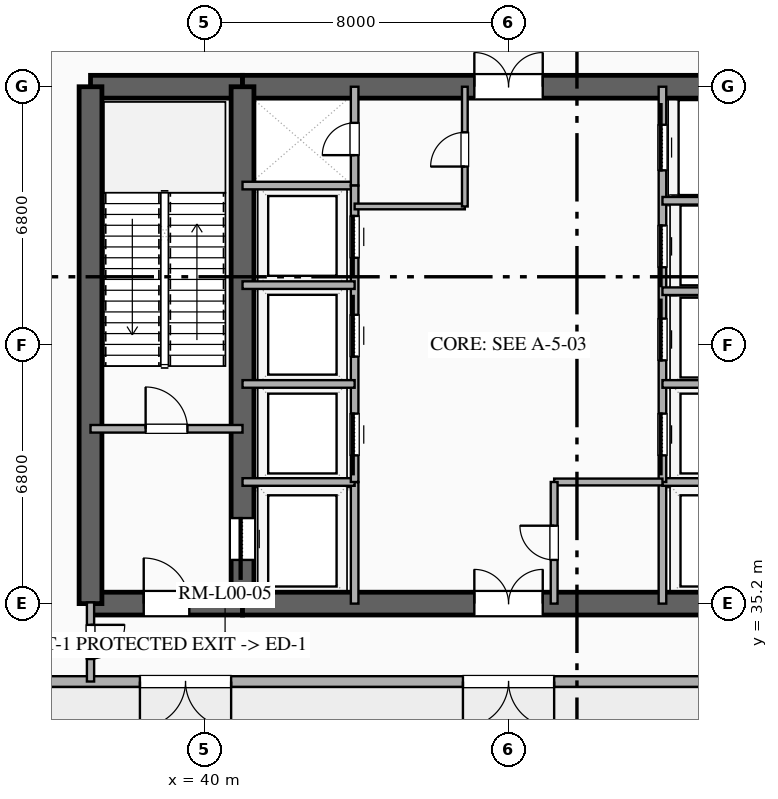
"""IFC4 building model, lengths in metres.
Left out: names, types, materials, properties, quantities, classifications, styles, units other than length and angle.
Written with IfcOpenShell. Run it as: python <this file> out.ifc"""

import sys

from ifc_helpers import new_model, si_unit, direction, frame, frame_2d, origin, place, context, subcontext, project, spatial, rectangle, extrude, element, fill, save


model = new_model("IFC4")
c1 = context("Model", 3, precision=1e-05, world=origin(), true_north=direction((0.0, 1.0)))
c2 = subcontext(c1, "Body", "Model", "MODEL_VIEW")
j1 = project(units=[si_unit("LENGTHUNIT", "METRE"), si_unit("PLANEANGLEUNIT", "RADIAN")], contexts=[c1])
p1 = place(None, origin())
s1 = spatial("IfcSite", under=j1, at=p1, CompositionType="ELEMENT")
p2 = place(p1, origin())
s2 = spatial("IfcBuilding", under=s1, at=p2, CompositionType="ELEMENT")
p3 = place(p2, origin())
s3 = spatial("IfcBuildingStorey", under=s2, at=p3, CompositionType="ELEMENT", Elevation=0.0)
p4 = place(p3, frame((37.0, 35.2, 0.0), z_axis=(0.0, 0.0, 1.0), x_axis=(1.0, 0.0, 0.0)))
e1 = element("IfcWall", 1, at=p4, inside=s3, PredefinedType="SHEAR", context=c2, shape_type="SweptSolid", body=[
    extrude(rectangle(XDim=4.0, YDim=0.6, at=frame_2d((2.0, 0.0))), origin(), (0.0, 0.0, 1.0), 5.72),
])
p5 = place(p4, frame((1.4, 0.0, 0.0)))
e2 = element("IfcOpeningElement", 2, at=p5, cuts=e1, PredefinedType="OPENING", context=c2, shape_type="SweptSolid", body=[
    extrude(rectangle(XDim=1.2, YDim=2.15, at=frame_2d((0.6, 1.075))), frame((0.0, 0.31, 0.0), z_axis=(0.0, -1.0, 0.0), x_axis=(1.0, 0.0, 0.0)), (0.0, 0.0, 1.0), 0.62),
])
p6 = place(p3, frame((41.0, 35.2, 0.0), z_axis=(0.0, 0.0, 1.0), x_axis=(1.0, 0.0, 0.0)))
e3 = element("IfcWall", 3, at=p6, inside=s3, PredefinedType="SHEAR", context=c2, shape_type="SweptSolid", body=[
    extrude(rectangle(XDim=14.0, YDim=0.6, at=frame_2d((7.0, 0.0))), origin(), (0.0, 0.0, 1.0), 5.72),
])
p7 = place(p6, frame((6.1, 0.0, 0.0)))
e4 = element("IfcOpeningElement", 4, at=p7, cuts=e3, PredefinedType="OPENING", context=c2, shape_type="SweptSolid", body=[
    extrude(rectangle(XDim=1.8, YDim=2.25, at=frame_2d((0.9, 1.125))), frame((0.0, 0.31, 0.0), z_axis=(0.0, -1.0, 0.0), x_axis=(1.0, 0.0, 0.0)), (0.0, 0.0, 1.0), 0.62),
])
p8 = place(p3, frame((37.0, 48.8, 0.0), z_axis=(0.0, 0.0, 1.0), x_axis=(1.0, 0.0, 0.0)))
e5 = element("IfcWall", 5, at=p8, inside=s3, PredefinedType="SHEAR", context=c2, shape_type="SweptSolid", body=[
    extrude(rectangle(XDim=4.0, YDim=0.6, at=frame_2d((2.0, 0.0))), origin(), (0.0, 0.0, 1.0), 5.72),
])
p9 = place(p3, frame((41.0, 48.8, 0.0), z_axis=(0.0, 0.0, 1.0), x_axis=(1.0, 0.0, 0.0)))
e6 = element("IfcWall", 6, at=p9, inside=s3, PredefinedType="SHEAR", context=c2, shape_type="SweptSolid", body=[
    extrude(rectangle(XDim=14.0, YDim=0.6, at=frame_2d((7.0, 0.0))), origin(), (0.0, 0.0, 1.0), 5.72),
])
p10 = place(p9, frame((6.1, 0.0, 0.0)))
e7 = element("IfcOpeningElement", 7, at=p10, cuts=e6, PredefinedType="OPENING", context=c2, shape_type="SweptSolid", body=[
    extrude(rectangle(XDim=1.8, YDim=2.25, at=frame_2d((0.9, 1.125))), frame((0.0, 0.31, 0.0), z_axis=(0.0, -1.0, 0.0), x_axis=(1.0, 0.0, 0.0)), (0.0, 0.0, 1.0), 0.62),
])
p11 = place(p3, frame((37.0, 35.2, 0.0), z_axis=(0.0, 0.0, 1.0), x_axis=(0.0, 1.0, 0.0)))
e8 = element("IfcWall", 8, at=p11, inside=s3, PredefinedType="SHEAR", context=c2, shape_type="SweptSolid", body=[
    extrude(rectangle(XDim=13.6, YDim=0.6, at=frame_2d((6.8, 0.0))), origin(), (0.0, 0.0, 1.0), 5.72),
])
p12 = place(p3, frame((41.0, 35.2, 0.0), z_axis=(0.0, 0.0, 1.0), x_axis=(0.0, 1.0, 0.0)))
e9 = element("IfcWall", 9, at=p12, inside=s3, PredefinedType="SHEAR", context=c2, shape_type="SweptSolid", body=[
    extrude(rectangle(XDim=13.6, YDim=0.6, at=frame_2d((6.8, 0.0))), origin(), (0.0, 0.0, 1.0), 5.72),
])
p13 = place(p12, frame((1.15, 0.0, 0.0)))
e10 = element("IfcOpeningElement", 10, at=p13, cuts=e9, PredefinedType="OPENING", context=c2, shape_type="SweptSolid", body=[
    extrude(rectangle(XDim=1.1, YDim=2.2, at=frame_2d((0.55, 1.1))), frame((0.0, 0.31, 0.0), z_axis=(0.0, -1.0, 0.0), x_axis=(1.0, 0.0, 0.0)), (0.0, 0.0, 1.0), 0.62),
])
p14 = place(p3, frame((88.0, 33.15, 0.0), z_axis=(0.0, 0.0, 1.0), x_axis=(-1.0, 0.0, 0.0)))
e11 = element("IfcWall", 11, at=p14, inside=s3, PredefinedType="SOLIDWALL", context=c2, shape_type="SweptSolid", body=[
    extrude(rectangle(XDim=80.0, YDim=0.28, at=frame_2d((40.0, 0.0))), origin(), (0.0, 0.0, 1.0), 5.72),
])
p15 = place(p14, frame((47.3, 0.0, 0.0)))
e12 = element("IfcOpeningElement", 12, at=p15, cuts=e11, PredefinedType="OPENING", context=c2, shape_type="SweptSolid", body=[
    extrude(rectangle(XDim=2.4, YDim=2.6, at=frame_2d((1.2, 1.3))), frame((0.0, 0.15, 0.0), z_axis=(0.0, -1.0, 0.0), x_axis=(1.0, 0.0, 0.0)), (0.0, 0.0, 1.0), 0.3),
])
p16 = place(p14, frame((38.8, 0.0, 0.0)))
e13 = element("IfcOpeningElement", 13, at=p16, cuts=e11, PredefinedType="OPENING", context=c2, shape_type="SweptSolid", body=[
    extrude(rectangle(XDim=2.4, YDim=2.6, at=frame_2d((1.2, 1.3))), frame((0.0, 0.15, 0.0), z_axis=(0.0, -1.0, 0.0), x_axis=(1.0, 0.0, 0.0)), (0.0, 0.0, 1.0), 0.3),
])
p17 = place(p14, frame((30.3, 0.0, 0.0)))
e14 = element("IfcOpeningElement", 14, at=p17, cuts=e11, PredefinedType="OPENING", context=c2, shape_type="SweptSolid", body=[
    extrude(rectangle(XDim=2.4, YDim=2.6, at=frame_2d((1.2, 1.3))), frame((0.0, 0.15, 0.0), z_axis=(0.0, -1.0, 0.0), x_axis=(1.0, 0.0, 0.0)), (0.0, 0.0, 1.0), 0.3),
])
p18 = place(p3, frame((37.0, 39.8, 0.0), z_axis=(0.0, 0.0, 1.0), x_axis=(1.0, 0.0, 0.0)))
e15 = element("IfcWall", 15, at=p18, inside=s3, PredefinedType="SOLIDWALL", context=c2, shape_type="SweptSolid", body=[
    extrude(rectangle(XDim=4.0, YDim=0.2, at=frame_2d((2.0, 0.0))), origin(), (0.0, 0.0, 1.0), 4.92),
])
p19 = place(p18, frame((1.45, 0.0, 0.0)))
e16 = element("IfcOpeningElement", 16, at=p19, cuts=e15, PredefinedType="OPENING", context=c2, shape_type="SweptSolid", body=[
    extrude(rectangle(XDim=1.1, YDim=2.15, at=frame_2d((0.55, 1.075))), frame((0.0, 0.11, 0.0), z_axis=(0.0, -1.0, 0.0), x_axis=(1.0, 0.0, 0.0)), (0.0, 0.0, 1.0), 0.22),
])
p20 = place(p3, frame((43.95, 35.2, 0.0), z_axis=(0.0, 0.0, 1.0), x_axis=(0.0, 1.0, 0.0)))
e17 = element("IfcWall", 17, at=p20, inside=s3, PredefinedType="SOLIDWALL", context=c2, shape_type="SweptSolid", body=[
    extrude(rectangle(XDim=3.2, YDim=0.2, at=frame_2d((1.6, 0.0))), origin(), (0.0, 0.0, 1.0), 4.92),
])
p21 = place(p3, frame((41.0, 38.4, 0.0), z_axis=(0.0, 0.0, 1.0), x_axis=(1.0, 0.0, 0.0)))
e18 = element("IfcWall", 18, at=p21, inside=s3, PredefinedType="SOLIDWALL", context=c2, shape_type="SweptSolid", body=[
    extrude(rectangle(XDim=2.95, YDim=0.2, at=frame_2d((1.475, 0.0))), origin(), (0.0, 0.0, 1.0), 4.92),
])
p22 = place(p3, frame((52.05, 35.2, 0.0), z_axis=(0.0, 0.0, 1.0), x_axis=(0.0, 1.0, 0.0)))
e19 = element("IfcWall", 19, at=p22, inside=s3, PredefinedType="SOLIDWALL", context=c2, shape_type="SweptSolid", body=[
    extrude(rectangle(XDim=3.2, YDim=0.2, at=frame_2d((1.6, 0.0))), origin(), (0.0, 0.0, 1.0), 4.92),
])
for number, where, z_axis, x_axis in (
    (20, (52.05, 38.4, 0.0), (0.0, 0.0, 1.0), (1.0, 0.0, 0.0)),
    (21, (41.0, 46.2, 0.0), (0.0, 0.0, 1.0), (1.0, 0.0, 0.0)),
):
    element("IfcWall", number, at=place(p3, frame(where, z_axis=z_axis, x_axis=x_axis)), inside=s3, PredefinedType="SOLIDWALL", context=c2, shape_type="SweptSolid", body=[
        extrude(rectangle(XDim=2.95, YDim=0.2, at=frame_2d((1.475, 0.0))), origin(), (0.0, 0.0, 1.0), 4.92),
    ])
p23 = place(p3, frame((43.95, 46.2, 0.0), z_axis=(0.0, 0.0, 1.0), x_axis=(0.0, 1.0, 0.0)))
e22 = element("IfcWall", 22, at=p23, inside=s3, PredefinedType="SOLIDWALL", context=c2, shape_type="SweptSolid", body=[
    extrude(rectangle(XDim=2.6, YDim=0.2, at=frame_2d((1.3, 0.0))), origin(), (0.0, 0.0, 1.0), 4.92),
])
p24 = place(p23, frame((0.8, 0.0, 0.0)))
e23 = element("IfcOpeningElement", 23, at=p24, cuts=e22, PredefinedType="OPENING", context=c2, shape_type="SweptSolid", body=[
    extrude(rectangle(XDim=0.85, YDim=2.15, at=frame_2d((0.425, 1.075))), frame((0.0, 0.11, 0.0), z_axis=(0.0, -1.0, 0.0), x_axis=(1.0, 0.0, 0.0)), (0.0, 0.0, 1.0), 0.22),
])
p25 = place(p3, frame((43.95, 38.4, 0.0), z_axis=(0.0, 0.0, 1.0), x_axis=(0.0, 1.0, 0.0)))
e24 = element("IfcWall", 24, at=p25, inside=s3, PredefinedType="SOLIDWALL", context=c2, shape_type="SweptSolid", body=[
    extrude(rectangle(XDim=7.8, YDim=0.2, at=frame_2d((3.9, 0.0))), origin(), (0.0, 0.0, 1.0), 4.92),
])
p26 = place(p25, frame((0.7, 0.0, 0.0)))
e25 = element("IfcOpeningElement", 25, at=p26, cuts=e24, PredefinedType="OPENING", context=c2, shape_type="SweptSolid", body=[
    extrude(rectangle(XDim=1.1, YDim=2.2, at=frame_2d((0.55, 1.1))), frame((0.0, 0.11, 0.0), z_axis=(0.0, -1.0, 0.0), x_axis=(1.0, 0.0, 0.0)), (0.0, 0.0, 1.0), 0.22),
])
p27 = place(p25, frame((3.3, 0.0, 0.0)))
e26 = element("IfcOpeningElement", 26, at=p27, cuts=e24, PredefinedType="OPENING", context=c2, shape_type="SweptSolid", body=[
    extrude(rectangle(XDim=1.1, YDim=2.2, at=frame_2d((0.55, 1.1))), frame((0.0, 0.11, 0.0), z_axis=(0.0, -1.0, 0.0), x_axis=(1.0, 0.0, 0.0)), (0.0, 0.0, 1.0), 0.22),
])
p28 = place(p25, frame((5.9, 0.0, 0.0)))
e27 = element("IfcOpeningElement", 27, at=p28, cuts=e24, PredefinedType="OPENING", context=c2, shape_type="SweptSolid", body=[
    extrude(rectangle(XDim=1.1, YDim=2.2, at=frame_2d((0.55, 1.1))), frame((0.0, 0.11, 0.0), z_axis=(0.0, -1.0, 0.0), x_axis=(1.0, 0.0, 0.0)), (0.0, 0.0, 1.0), 0.22),
])
for number, where, z_axis, x_axis in (
    (28, (41.0, 40.98, 0.0), (0.0, 0.0, 1.0), (1.0, 0.0, 0.0)),
    (29, (41.0, 43.58, 0.0), (0.0, 0.0, 1.0), (1.0, 0.0, 0.0)),
):
    element("IfcWall", number, at=place(p3, frame(where, z_axis=z_axis, x_axis=x_axis)), inside=s3, PredefinedType="SOLIDWALL", context=c2, shape_type="SweptSolid", body=[
        extrude(rectangle(XDim=2.95, YDim=0.2, at=frame_2d((1.475, 0.0))), origin(), (0.0, 0.0, 1.0), 4.92),
    ])
p29 = place(p3, frame((52.05, 38.4, 0.0), z_axis=(0.0, 0.0, 1.0), x_axis=(0.0, 1.0, 0.0)))
e30 = element("IfcWall", 30, at=p29, inside=s3, PredefinedType="SOLIDWALL", context=c2, shape_type="SweptSolid", body=[
    extrude(rectangle(XDim=10.4, YDim=0.2, at=frame_2d((5.2, 0.0))), origin(), (0.0, 0.0, 1.0), 4.92),
])
p30 = place(p29, frame((0.7, 0.0, 0.0)))
e31 = element("IfcOpeningElement", 31, at=p30, cuts=e30, PredefinedType="OPENING", context=c2, shape_type="SweptSolid", body=[
    extrude(rectangle(XDim=1.1, YDim=2.2, at=frame_2d((0.55, 1.1))), frame((0.0, 0.11, 0.0), z_axis=(0.0, -1.0, 0.0), x_axis=(1.0, 0.0, 0.0)), (0.0, 0.0, 1.0), 0.22),
])
p31 = place(p29, frame((3.2, 0.0, 0.0)))
e32 = element("IfcOpeningElement", 32, at=p31, cuts=e30, PredefinedType="OPENING", context=c2, shape_type="SweptSolid", body=[
    extrude(rectangle(XDim=1.1, YDim=2.2, at=frame_2d((0.55, 1.1))), frame((0.0, 0.11, 0.0), z_axis=(0.0, -1.0, 0.0), x_axis=(1.0, 0.0, 0.0)), (0.0, 0.0, 1.0), 0.22),
])
p32 = place(p29, frame((5.65, 0.0, 0.0)))
e33 = element("IfcOpeningElement", 33, at=p32, cuts=e30, PredefinedType="OPENING", context=c2, shape_type="SweptSolid", body=[
    extrude(rectangle(XDim=1.1, YDim=2.2, at=frame_2d((0.55, 1.1))), frame((0.0, 0.11, 0.0), z_axis=(0.0, -1.0, 0.0), x_axis=(1.0, 0.0, 0.0)), (0.0, 0.0, 1.0), 0.22),
])
p33 = place(p29, frame((8.2, 0.0, 0.0)))
e34 = element("IfcOpeningElement", 34, at=p33, cuts=e30, PredefinedType="OPENING", context=c2, shape_type="SweptSolid", body=[
    extrude(rectangle(XDim=1.2, YDim=2.2, at=frame_2d((0.6, 1.1))), frame((0.0, 0.11, 0.0), z_axis=(0.0, -1.0, 0.0), x_axis=(1.0, 0.0, 0.0)), (0.0, 0.0, 1.0), 0.22),
])
for number, where, z_axis, x_axis in (
    (35, (52.05, 40.98, 0.0), (0.0, 0.0, 1.0), (1.0, 0.0, 0.0)),
    (36, (52.05, 43.42, 0.0), (0.0, 0.0, 1.0), (1.0, 0.0, 0.0)),
    (37, (52.05, 45.8, 0.0), (0.0, 0.0, 1.0), (1.0, 0.0, 0.0)),
):
    element("IfcWall", number, at=place(p3, frame(where, z_axis=z_axis, x_axis=x_axis)), inside=s3, PredefinedType="SOLIDWALL", context=c2, shape_type="SweptSolid", body=[
        extrude(rectangle(XDim=2.95, YDim=0.2, at=frame_2d((1.475, 0.0))), origin(), (0.0, 0.0, 1.0), 4.92),
    ])
p34 = place(p3, frame((43.95, 45.65, 0.0), z_axis=(0.0, 0.0, 1.0), x_axis=(1.0, 0.0, 0.0)))
e38 = element("IfcWall", 38, at=p34, inside=s3, PredefinedType="PARTITIONING", context=c2, shape_type="SweptSolid", body=[
    extrude(rectangle(XDim=2.9, YDim=0.15, at=frame_2d((1.45, 0.0))), origin(), (0.0, 0.0, 1.0), 4.92),
])
p35 = place(p3, frame((46.85, 45.65, 0.0), z_axis=(0.0, 0.0, 1.0), x_axis=(0.0, 1.0, 0.0)))
e39 = element("IfcWall", 39, at=p35, inside=s3, PredefinedType="PARTITIONING", context=c2, shape_type="SweptSolid", body=[
    extrude(rectangle(XDim=3.15, YDim=0.15, at=frame_2d((1.575, 0.0))), origin(), (0.0, 0.0, 1.0), 4.92),
])
p36 = place(p35, frame((1.05, 0.0, 0.0)))
e40 = element("IfcOpeningElement", 40, at=p36, cuts=e39, PredefinedType="OPENING", context=c2, shape_type="SweptSolid", body=[
    extrude(rectangle(XDim=0.9, YDim=2.15, at=frame_2d((0.45, 1.075))), frame((0.0, 0.085, 0.0), z_axis=(0.0, -1.0, 0.0), x_axis=(1.0, 0.0, 0.0)), (0.0, 0.0, 1.0), 0.17),
])
p37 = place(p3, frame((49.2, 38.4, 0.0), z_axis=(0.0, 0.0, 1.0), x_axis=(1.0, 0.0, 0.0)))
e41 = element("IfcWall", 41, at=p37, inside=s3, PredefinedType="PLUMBINGWALL", context=c2, shape_type="SweptSolid", body=[
    extrude(rectangle(XDim=2.85, YDim=0.18, at=frame_2d((1.425, 0.0))), origin(), (0.0, 0.0, 1.0), 4.92),
])
p38 = place(p3, frame((49.2, 35.2, 0.0), z_axis=(0.0, 0.0, 1.0), x_axis=(0.0, 1.0, 0.0)))
e42 = element("IfcWall", 42, at=p38, inside=s3, PredefinedType="PLUMBINGWALL", context=c2, shape_type="SweptSolid", body=[
    extrude(rectangle(XDim=3.2, YDim=0.18, at=frame_2d((1.6, 0.0))), origin(), (0.0, 0.0, 1.0), 4.92),
])
p39 = place(p38, frame((1.15, 0.0, 0.0)))
e43 = element("IfcOpeningElement", 43, at=p39, cuts=e42, PredefinedType="OPENING", context=c2, shape_type="SweptSolid", body=[
    extrude(rectangle(XDim=0.9, YDim=2.1, at=frame_2d((0.45, 1.05))), frame((0.0, 0.1, 0.0), z_axis=(0.0, -1.0, 0.0), x_axis=(1.0, 0.0, 0.0)), (0.0, 0.0, 1.0), 0.2),
])
p40 = place(p3, frame((37.0, 35.232, 0.0), z_axis=(0.0, 0.0, 1.0), x_axis=(0.0, -1.0, 0.0)))
e44 = element("IfcWall", 44, at=p40, inside=s3, PredefinedType="PARTITIONING", context=c2, shape_type="SweptSolid", body=[
    extrude(rectangle(XDim=2.082, YDim=0.19, at=frame_2d((1.041, 0.0))), origin(), (0.0, 0.0, 1.0), 4.92),
])
p41 = place(p40, frame((0.591, 0.0, 0.0)))
e45 = element("IfcOpeningElement", 45, at=p41, cuts=e44, PredefinedType="OPENING", context=c2, shape_type="SweptSolid", body=[
    extrude(rectangle(XDim=0.9, YDim=2.15, at=frame_2d((0.45, 1.075))), frame((0.0, 0.105, 0.0), z_axis=(0.0, -1.0, 0.0), x_axis=(1.0, 0.0, 0.0)), (0.0, 0.0, 1.0), 0.21),
])
p42 = place(p15, origin())
e46 = element("IfcDoor", 46, at=p42, inside=s3, OperationType="DOUBLE_DOOR_SINGLE_SWING", PredefinedType="DOOR", context=c2, shape_type="SweptSolid", body=[
    extrude(rectangle(XDim=2.4, YDim=2.6, at=frame_2d((1.2, 1.3))), frame((0.0, 0.025, 0.0), z_axis=(0.0, -1.0, 0.0), x_axis=(1.0, 0.0, 0.0)), (0.0, 0.0, 1.0), 0.05),
])
fill(e12, e46)
p43 = place(p16, origin())
e47 = element("IfcDoor", 47, at=p43, inside=s3, OperationType="DOUBLE_DOOR_SINGLE_SWING", PredefinedType="DOOR", context=c2, shape_type="SweptSolid", body=[
    extrude(rectangle(XDim=2.4, YDim=2.6, at=frame_2d((1.2, 1.3))), frame((0.0, 0.025, 0.0), z_axis=(0.0, -1.0, 0.0), x_axis=(1.0, 0.0, 0.0)), (0.0, 0.0, 1.0), 0.05),
])
fill(e13, e47)
p44 = place(p13, origin())
e48 = element("IfcDoor", 48, at=p44, inside=s3, OperationType="SLIDING_TO_LEFT", PredefinedType="DOOR", context=c2, shape_type="SweptSolid", body=[
    extrude(rectangle(XDim=1.1, YDim=2.2, at=frame_2d((0.55, 1.1))), frame((0.0, 0.025, 0.0), z_axis=(0.0, -1.0, 0.0), x_axis=(1.0, 0.0, 0.0)), (0.0, 0.0, 1.0), 0.05),
])
fill(e10, e48)
p45 = place(p5, origin())
e49 = element("IfcDoor", 49, at=p45, inside=s3, OperationType="SINGLE_SWING_LEFT", PredefinedType="DOOR", context=c2, shape_type="SweptSolid", body=[
    extrude(rectangle(XDim=1.2, YDim=2.15, at=frame_2d((0.6, 1.075))), frame((0.0, 0.025, 0.0), z_axis=(0.0, -1.0, 0.0), x_axis=(1.0, 0.0, 0.0)), (0.0, 0.0, 1.0), 0.05),
])
fill(e2, e49)
p46 = place(p7, origin())
e50 = element("IfcDoor", 50, at=p46, inside=s3, OperationType="DOUBLE_DOOR_SINGLE_SWING", PredefinedType="DOOR", context=c2, shape_type="SweptSolid", body=[
    extrude(rectangle(XDim=1.8, YDim=2.25, at=frame_2d((0.9, 1.125))), frame((0.0, 0.025, 0.0), z_axis=(0.0, -1.0, 0.0), x_axis=(1.0, 0.0, 0.0)), (0.0, 0.0, 1.0), 0.05),
])
fill(e4, e50)
p47 = place(p10, origin())
e51 = element("IfcDoor", 51, at=p47, inside=s3, OperationType="DOUBLE_DOOR_SINGLE_SWING", PredefinedType="DOOR", context=c2, shape_type="SweptSolid", body=[
    extrude(rectangle(XDim=1.8, YDim=2.25, at=frame_2d((0.9, 1.125))), frame((0.0, 0.025, 0.0), z_axis=(0.0, -1.0, 0.0), x_axis=(1.0, 0.0, 0.0)), (0.0, 0.0, 1.0), 0.05),
])
fill(e7, e51)
p48 = place(p19, origin())
e52 = element("IfcDoor", 52, at=p48, inside=s3, OperationType="SINGLE_SWING_LEFT", PredefinedType="DOOR", context=c2, shape_type="SweptSolid", body=[
    extrude(rectangle(XDim=1.1, YDim=2.15, at=frame_2d((0.55, 1.075))), frame((0.0, 0.025, 0.0), z_axis=(0.0, -1.0, 0.0), x_axis=(1.0, 0.0, 0.0)), (0.0, 0.0, 1.0), 0.05),
])
fill(e16, e52)
p49 = place(p24, origin())
e53 = element("IfcDoor", 53, at=p49, inside=s3, OperationType="SINGLE_SWING_LEFT", PredefinedType="DOOR", context=c2, shape_type="SweptSolid", body=[
    extrude(rectangle(XDim=0.85, YDim=2.15, at=frame_2d((0.425, 1.075))), frame((0.0, 0.025, 0.0), z_axis=(0.0, -1.0, 0.0), x_axis=(1.0, 0.0, 0.0)), (0.0, 0.0, 1.0), 0.05),
])
fill(e23, e53)
p50 = place(p26, origin())
e54 = element("IfcDoor", 54, at=p50, inside=s3, OperationType="SLIDING_TO_LEFT", PredefinedType="DOOR", context=c2, shape_type="SweptSolid", body=[
    extrude(rectangle(XDim=1.1, YDim=2.2, at=frame_2d((0.55, 1.1))), frame((0.0, 0.025, 0.0), z_axis=(0.0, -1.0, 0.0), x_axis=(1.0, 0.0, 0.0)), (0.0, 0.0, 1.0), 0.05),
])
fill(e25, e54)
p51 = place(p27, origin())
e55 = element("IfcDoor", 55, at=p51, inside=s3, OperationType="SLIDING_TO_RIGHT", PredefinedType="DOOR", context=c2, shape_type="SweptSolid", body=[
    extrude(rectangle(XDim=1.1, YDim=2.2, at=frame_2d((0.55, 1.1))), frame((0.0, 0.025, 0.0), z_axis=(0.0, -1.0, 0.0), x_axis=(1.0, 0.0, 0.0)), (0.0, 0.0, 1.0), 0.05),
])
fill(e26, e55)
p52 = place(p28, origin())
e56 = element("IfcDoor", 56, at=p52, inside=s3, OperationType="SLIDING_TO_LEFT", PredefinedType="DOOR", context=c2, shape_type="SweptSolid", body=[
    extrude(rectangle(XDim=1.1, YDim=2.2, at=frame_2d((0.55, 1.1))), frame((0.0, 0.025, 0.0), z_axis=(0.0, -1.0, 0.0), x_axis=(1.0, 0.0, 0.0)), (0.0, 0.0, 1.0), 0.05),
])
fill(e27, e56)
p53 = place(p30, origin())
e57 = element("IfcDoor", 57, at=p53, inside=s3, OperationType="SLIDING_TO_LEFT", PredefinedType="DOOR", context=c2, shape_type="SweptSolid", body=[
    extrude(rectangle(XDim=1.1, YDim=2.2, at=frame_2d((0.55, 1.1))), frame((0.0, 0.025, 0.0), z_axis=(0.0, -1.0, 0.0), x_axis=(1.0, 0.0, 0.0)), (0.0, 0.0, 1.0), 0.05),
])
fill(e31, e57)
p54 = place(p31, origin())
e58 = element("IfcDoor", 58, at=p54, inside=s3, OperationType="SLIDING_TO_RIGHT", PredefinedType="DOOR", context=c2, shape_type="SweptSolid", body=[
    extrude(rectangle(XDim=1.1, YDim=2.2, at=frame_2d((0.55, 1.1))), frame((0.0, 0.025, 0.0), z_axis=(0.0, -1.0, 0.0), x_axis=(1.0, 0.0, 0.0)), (0.0, 0.0, 1.0), 0.05),
])
fill(e32, e58)
p55 = place(p32, origin())
e59 = element("IfcDoor", 59, at=p55, inside=s3, OperationType="SLIDING_TO_LEFT", PredefinedType="DOOR", context=c2, shape_type="SweptSolid", body=[
    extrude(rectangle(XDim=1.1, YDim=2.2, at=frame_2d((0.55, 1.1))), frame((0.0, 0.025, 0.0), z_axis=(0.0, -1.0, 0.0), x_axis=(1.0, 0.0, 0.0)), (0.0, 0.0, 1.0), 0.05),
])
fill(e33, e59)
p56 = place(p33, origin())
e60 = element("IfcDoor", 60, at=p56, inside=s3, OperationType="SLIDING_TO_RIGHT", PredefinedType="DOOR", context=c2, shape_type="SweptSolid", body=[
    extrude(rectangle(XDim=1.2, YDim=2.2, at=frame_2d((0.6, 1.1))), frame((0.0, 0.025, 0.0), z_axis=(0.0, -1.0, 0.0), x_axis=(1.0, 0.0, 0.0)), (0.0, 0.0, 1.0), 0.05),
])
fill(e34, e60)
p57 = place(p36, origin())
e61 = element("IfcDoor", 61, at=p57, inside=s3, OperationType="SINGLE_SWING_LEFT", PredefinedType="DOOR", context=c2, shape_type="SweptSolid", body=[
    extrude(rectangle(XDim=0.9, YDim=2.15, at=frame_2d((0.45, 1.075))), frame((0.0, 0.025, 0.0), z_axis=(0.0, -1.0, 0.0), x_axis=(1.0, 0.0, 0.0)), (0.0, 0.0, 1.0), 0.05),
])
fill(e40, e61)
p58 = place(p39, origin())
e62 = element("IfcDoor", 62, at=p58, inside=s3, OperationType="SINGLE_SWING_RIGHT", PredefinedType="DOOR", context=c2, shape_type="SweptSolid", body=[
    extrude(rectangle(XDim=0.9, YDim=2.1, at=frame_2d((0.45, 1.05))), frame((0.0, 0.025, 0.0), z_axis=(0.0, -1.0, 0.0), x_axis=(1.0, 0.0, 0.0)), (0.0, 0.0, 1.0), 0.05),
])
fill(e43, e62)
p59 = place(p41, origin())
e63 = element("IfcDoor", 63, at=p59, inside=s3, OperationType="SINGLE_SWING_LEFT", PredefinedType="DOOR", context=c2, shape_type="SweptSolid", body=[
    extrude(rectangle(XDim=0.9, YDim=2.15, at=frame_2d((0.45, 1.075))), frame((0.0, 0.025, 0.0), z_axis=(0.0, -1.0, 0.0), x_axis=(1.0, 0.0, 0.0)), (0.0, 0.0, 1.0), 0.05),
])
fill(e45, e63)
save(model, sys.argv[1])
